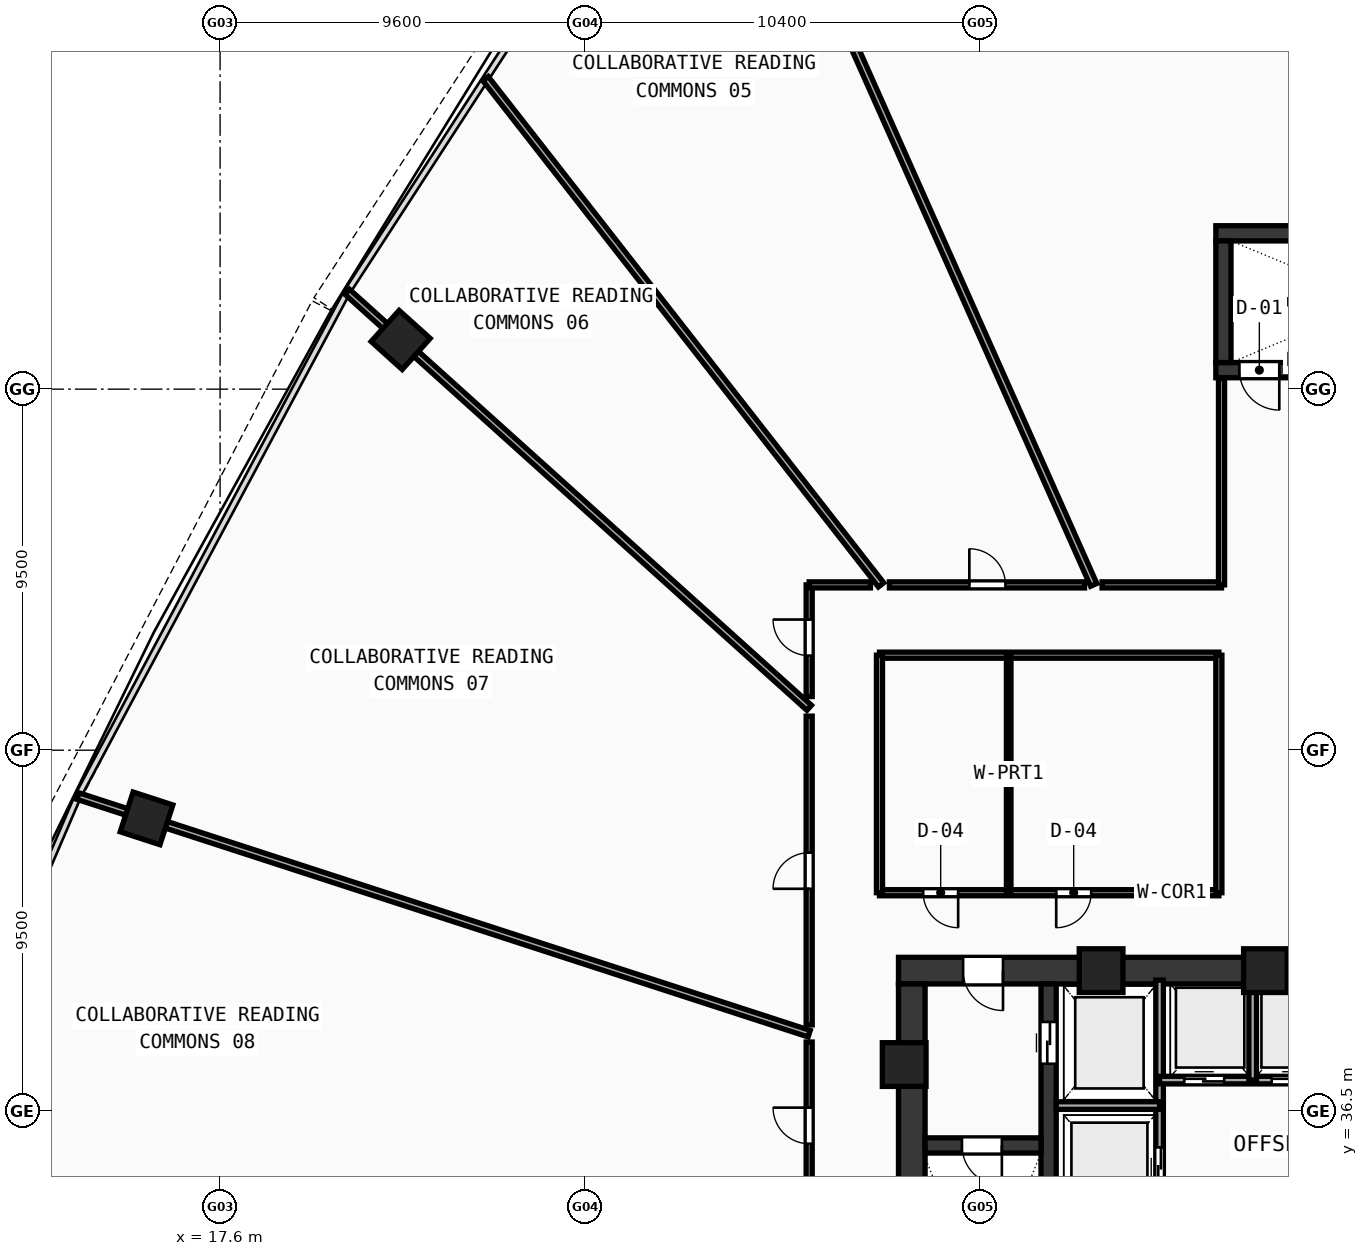
"""IFC4 building model, lengths in metres.
Left out: names, types, materials, properties, quantities, classifications, styles, units other than length and angle.
Written with IfcOpenShell. Run it as: python <this file> out.ifc"""

import sys

from ifc_helpers import new_model, si_unit, direction, frame, frame_2d, origin, origin_with_axes, origin_2d, place, context, subcontext, project, spatial, rectangle, hollow_rectangle, extrude, source, transform, mapped, element, fill, save


model = new_model("IFC4")
c1 = context("Model", 3, precision=1e-05, world=origin(), true_north=direction((0.0, 1.0)))
c2 = subcontext(c1, "Body", "Model", "MODEL_VIEW")
j1 = project(units=[si_unit("LENGTHUNIT", "METRE"), si_unit("PLANEANGLEUNIT", "RADIAN")], contexts=[c1])
p1 = place(None, origin())
s1 = spatial("IfcSite", under=j1, at=p1, CompositionType="ELEMENT")
p2 = place(p1, origin())
s2 = spatial("IfcBuilding", under=s1, at=p2, CompositionType="ELEMENT")
p3 = place(p2, frame((0.0, 0.0, 30.4)))
s3 = spatial("IfcBuildingStorey", under=s2, at=p3, CompositionType="ELEMENT", Elevation=30.4)
p4 = place(p3, frame((35.45, 40.2, 0.0), z_axis=(0.0, 0.0, 1.0), x_axis=(1.0, 0.0, 0.0)))
e1 = element("IfcWall", 1, at=p4, inside=s3, PredefinedType="SHEAR", context=c2, shape_type="SweptSolid", body=[
    extrude(rectangle(XDim=11.35, YDim=0.7, at=frame_2d((5.675, 0.0))), origin(), (0.0, 0.0, 1.0), 3.37),
])
p5 = place(p4, frame((1.7, 0.0, 0.0)))
e2 = element("IfcOpeningElement", 2, at=p5, cuts=e1, PredefinedType="OPENING", context=c2, shape_type="SweptSolid", body=[
    extrude(rectangle(XDim=1.05, YDim=2.1, at=frame_2d((0.525, 1.05))), frame((0.0, 0.36, 0.0), z_axis=(0.0, -1.0, 0.0), x_axis=(1.0, 0.0, 0.0)), (0.0, 0.0, 1.0), 0.72),
])
p6 = place(p3, frame((35.8, 27.85, 0.0), z_axis=(0.0, 0.0, 1.0), x_axis=(0.0, 1.0, 0.0)))
e3 = element("IfcWall", 3, at=p6, inside=s3, PredefinedType="SHEAR", context=c2, shape_type="SweptSolid", body=[
    extrude(rectangle(XDim=12.0, YDim=0.7, at=frame_2d((6.0, 0.0))), origin(), (0.0, 0.0, 1.0), 3.37),
])
p7 = place(p3, frame((39.4, 27.85, 0.0), z_axis=(0.0, 0.0, 1.0), x_axis=(0.0, 1.0, 0.0)))
e4 = element("IfcWall", 4, at=p7, inside=s3, PredefinedType="SHEAR", context=c2, shape_type="SweptSolid", body=[
    extrude(rectangle(XDim=12.0, YDim=0.4, at=frame_2d((6.0, 0.0))), origin(), (0.0, 0.0, 1.0), 3.37),
])
p8 = place(p7, frame((9.9, 0.0, 0.0)))
e5 = element("IfcOpeningElement", 5, at=p8, cuts=e4, PredefinedType="OPENING", context=c2, shape_type="SweptSolid", body=[
    extrude(rectangle(XDim=1.1, YDim=2.1, at=frame_2d((0.55, 1.05))), frame((0.0, 0.21, 0.0), z_axis=(0.0, -1.0, 0.0), x_axis=(1.0, 0.0, 0.0)), (0.0, 0.0, 1.0), 0.42),
])
p9 = place(p3, frame((36.15, 35.6, 0.0), z_axis=(0.0, 0.0, 1.0), x_axis=(1.0, 0.0, 0.0)))
e6 = element("IfcWall", 6, at=p9, inside=s3, PredefinedType="SHEAR", context=c2, shape_type="SweptSolid", body=[
    extrude(rectangle(XDim=3.05, YDim=0.4, at=frame_2d((1.525, 0.0))), origin(), (0.0, 0.0, 1.0), 3.37),
])
p10 = place(p9, frame((0.97, 0.0, 0.0)))
e7 = element("IfcOpeningElement", 7, at=p10, cuts=e6, PredefinedType="OPENING", context=c2, shape_type="SweptSolid", body=[
    extrude(rectangle(XDim=1.05, YDim=2.1, at=frame_2d((0.525, 1.05))), frame((0.0, 0.21, 0.0), z_axis=(0.0, -1.0, 0.0), x_axis=(1.0, 0.0, 0.0)), (0.0, 0.0, 1.0), 0.42),
])
p11 = place(p3, frame((43.8, 59.6, 0.0), z_axis=(0.0, 0.0, 1.0), x_axis=(1.0, 0.0, 0.0)))
e8 = element("IfcWall", 8, at=p11, inside=s3, PredefinedType="SHEAR", context=c2, shape_type="SweptSolid", body=[
    extrude(rectangle(XDim=8.5, YDim=0.4, at=frame_2d((4.25, 0.0))), origin(), (0.0, 0.0, 1.0), 3.37),
])
p12 = place(p3, frame((43.8, 56.0, 0.0), z_axis=(0.0, 0.0, 1.0), x_axis=(1.0, 0.0, 0.0)))
e9 = element("IfcWall", 9, at=p12, inside=s3, PredefinedType="SHEAR", context=c2, shape_type="SweptSolid", body=[
    extrude(rectangle(XDim=8.5, YDim=0.4, at=frame_2d((4.25, 0.0))), origin(), (0.0, 0.0, 1.0), 3.37),
])
p13 = place(p12, frame((0.62, 0.0, 0.0)))
e10 = element("IfcOpeningElement", 10, at=p13, cuts=e9, PredefinedType="OPENING", context=c2, shape_type="SweptSolid", body=[
    extrude(rectangle(XDim=1.05, YDim=2.1, at=frame_2d((0.525, 1.05))), frame((0.0, 0.21, 0.0), z_axis=(0.0, -1.0, 0.0), x_axis=(1.0, 0.0, 0.0)), (0.0, 0.0, 1.0), 0.42),
])
p14 = place(p3, frame((44.0, 56.2, 0.0), z_axis=(0.0, 0.0, 1.0), x_axis=(0.0, 1.0, 0.0)))
e11 = element("IfcWall", 11, at=p14, inside=s3, PredefinedType="SHEAR", context=c2, shape_type="SweptSolid", body=[
    extrude(rectangle(XDim=3.2, YDim=0.4, at=frame_2d((1.6, 0.0))), origin(), (0.0, 0.0, 1.0), 3.37),
])
m1 = source(origin(), c2, "Body", "SweptSolid", [
    extrude(hollow_rectangle(XDim=1.15, YDim=1.15, WallThickness=0.048, at=origin_2d()), origin(), (0.0, 0.0, 1.0), 3.63),
])
for number, where, z_axis, x_axis in (
    (12, (45.106, 40.2, -0.26), (0.0, 0.0, 1.0), (1.0, 0.0, 0.0)),
    (13, (40.781, 40.2, -0.26), (0.0, 0.0, 1.0), (1.0, 0.0, 0.0)),
    (14, (35.6, 37.729, -0.26), (0.0, 0.0, 1.0), (1.0, 0.0, 0.0)),
):
    element("IfcColumn", number, at=place(p3, frame(where, z_axis=z_axis, x_axis=x_axis)), inside=s3, PredefinedType="COLUMN", context=c2, shape_type="MappedRepresentation", body=[
        mapped(m1, transform((0.0, 0.0, 0.0), scale=1.0)),
    ])
m2 = source(origin(), c2, "Body", "SweptSolid", [
    extrude(hollow_rectangle(XDim=1.1, YDim=1.1, WallThickness=0.045, at=origin_2d()), origin(), (0.0, 0.0, 1.0), 3.63),
])
for number, where, z_axis, x_axis in (
    (15, (22.351, 56.794, -0.26), (0.0, 0.0, 1.0), (-0.669, -0.743, 0.0)),
    (16, (15.665, 44.206, -0.26), (0.0, 0.0, 1.0), (-0.309, -0.951, 0.0)),
):
    element("IfcColumn", number, at=place(p3, frame(where, z_axis=z_axis, x_axis=x_axis)), inside=s3, PredefinedType="COLUMN", context=c2, shape_type="MappedRepresentation", body=[
        mapped(m2, transform((0.0, 0.0, 0.0), scale=1.0)),
    ])
p15 = place(p3, frame((42.32, 33.5, 0.0), z_axis=(0.0, 0.0, 1.0), x_axis=(0.0, 1.0, 0.0)))
e17 = element("IfcWall", 17, at=p15, inside=s3, PredefinedType="SOLIDWALL", context=c2, shape_type="SweptSolid", body=[
    extrude(rectangle(XDim=6.45, YDim=0.2, at=frame_2d((3.225, 0.0))), origin(), (0.0, 0.0, 1.0), 3.37),
])
p16 = place(p15, frame((1.0, 0.0, 0.0)))
e18 = element("IfcOpeningElement", 18, at=p16, cuts=e17, PredefinedType="OPENING", context=c2, shape_type="SweptSolid", body=[
    extrude(rectangle(XDim=1.05, YDim=2.1, at=frame_2d((0.525, 1.05))), frame((0.0, 0.11, 0.0), z_axis=(0.0, -1.0, 0.0), x_axis=(1.0, 0.0, 0.0)), (0.0, 0.0, 1.0), 0.22),
])
p17 = place(p3, frame((39.6, 36.65, 0.0), z_axis=(0.0, 0.0, 1.0), x_axis=(1.0, 0.0, 0.0)))
e19 = element("IfcWall", 19, at=p17, inside=s3, PredefinedType="SOLIDWALL", context=c2, shape_type="SweptSolid", body=[
    extrude(rectangle(XDim=2.72, YDim=0.2, at=frame_2d((1.36, 0.0))), origin(), (0.0, 0.0, 1.0), 3.37),
])
p18 = place(p3, frame((42.32, 37.32, 0.0), z_axis=(0.0, 0.0, 1.0), x_axis=(1.0, 0.0, 0.0)))
e20 = element("IfcWall", 20, at=p18, inside=s3, PredefinedType="SOLIDWALL", context=c2, shape_type="SweptSolid", body=[
    extrude(rectangle(XDim=4.73, YDim=0.2, at=frame_2d((2.365, 0.0))), origin(), (0.0, 0.0, 1.0), 3.37),
])
p19 = place(p18, frame((0.65, 0.0, 0.0)))
e21 = element("IfcOpeningElement", 21, at=p19, cuts=e20, PredefinedType="OPENING", context=c2, shape_type="SweptSolid", body=[
    extrude(rectangle(XDim=1.05, YDim=2.1, at=frame_2d((0.525, 1.05))), frame((0.0, 0.11, 0.0), z_axis=(0.0, -1.0, 0.0), x_axis=(1.0, 0.0, 0.0)), (0.0, 0.0, 1.0), 0.22),
])
p20 = place(p18, frame((2.95, 0.0, 0.0)))
e22 = element("IfcOpeningElement", 22, at=p20, cuts=e20, PredefinedType="OPENING", context=c2, shape_type="SweptSolid", body=[
    extrude(rectangle(XDim=1.05, YDim=2.1, at=frame_2d((0.525, 1.05))), frame((0.0, 0.11, 0.0), z_axis=(0.0, -1.0, 0.0), x_axis=(1.0, 0.0, 0.0)), (0.0, 0.0, 1.0), 0.22),
])
p21 = place(p3, frame((44.77, 37.32, 0.0), z_axis=(0.0, 0.0, 1.0), x_axis=(0.0, 1.0, 0.0)))
e23 = element("IfcWall", 23, at=p21, inside=s3, PredefinedType="SOLIDWALL", context=c2, shape_type="SweptSolid", body=[
    extrude(rectangle(XDim=2.63, YDim=0.2, at=frame_2d((1.315, 0.0))), origin(), (0.0, 0.0, 1.0), 3.37),
])
p22 = place(p3, frame((34.95, 42.25, 0.0), z_axis=(0.0, 0.0, 1.0), x_axis=(1.0, 0.0, 0.0)))
e24 = element("IfcWall", 24, at=p22, inside=s3, PredefinedType="PARTITIONING", context=c2, shape_type="SweptSolid", body=[
    extrude(rectangle(XDim=8.93, YDim=0.16, at=frame_2d((4.465, 0.0))), origin(), (0.0, 0.0, 1.0), 2.67),
])
p23 = place(p22, frame((1.15, 0.0, 0.0)))
e25 = element("IfcOpeningElement", 25, at=p23, cuts=e24, PredefinedType="OPENING", context=c2, shape_type="SweptSolid", body=[
    extrude(rectangle(XDim=0.92, YDim=2.1, at=frame_2d((0.46, 1.05))), frame((0.0, 0.09, 0.0), z_axis=(0.0, -1.0, 0.0), x_axis=(1.0, 0.0, 0.0)), (0.0, 0.0, 1.0), 0.18),
])
p24 = place(p22, frame((4.65, 0.0, 0.0)))
e26 = element("IfcOpeningElement", 26, at=p24, cuts=e24, PredefinedType="OPENING", context=c2, shape_type="SweptSolid", body=[
    extrude(rectangle(XDim=0.92, YDim=2.1, at=frame_2d((0.46, 1.05))), frame((0.0, 0.09, 0.0), z_axis=(0.0, -1.0, 0.0), x_axis=(1.0, 0.0, 0.0)), (0.0, 0.0, 1.0), 0.18),
])
p25 = place(p3, frame((34.95, 48.5, 0.0), z_axis=(0.0, 0.0, 1.0), x_axis=(1.0, 0.0, 0.0)))
e27 = element("IfcWall", 27, at=p25, inside=s3, PredefinedType="PARTITIONING", context=c2, shape_type="SweptSolid", body=[
    extrude(rectangle(XDim=8.93, YDim=0.16, at=frame_2d((4.465, 0.0))), origin(), (0.0, 0.0, 1.0), 2.67),
])
for number, where, z_axis, x_axis in (
    (28, (34.95, 42.25, 0.0), (0.0, 0.0, 1.0), (0.0, 1.0, 0.0)),
    (29, (43.88, 42.25, 0.0), (0.0, 0.0, 1.0), (0.0, 1.0, 0.0)),
):
    element("IfcWall", number, at=place(p3, frame(where, z_axis=z_axis, x_axis=x_axis)), inside=s3, PredefinedType="PARTITIONING", context=c2, shape_type="SweptSolid", body=[
        extrude(rectangle(XDim=6.25, YDim=0.16, at=frame_2d((3.125, 0.0))), origin(), (0.0, 0.0, 1.0), 2.67),
    ])
p26 = place(p3, frame((38.35, 42.25, 0.0), z_axis=(0.0, 0.0, 1.0), x_axis=(0.0, 1.0, 0.0)))
e30 = element("IfcWall", 30, at=p26, inside=s3, PredefinedType="PARTITIONING", context=c2, shape_type="SweptSolid", body=[
    extrude(rectangle(XDim=6.25, YDim=0.12, at=frame_2d((3.125, 0.0))), origin(), (0.0, 0.0, 1.0), 2.67),
])
p27 = place(p3, frame((40.587, 50.35, 0.0), z_axis=(0.0, 0.0, 1.0), x_axis=(-0.406741199867, 0.913543428815, 0.0)))
e31 = element("IfcWall", 31, at=p27, inside=s3, PredefinedType="PARTITIONING", context=c2, shape_type="SweptSolid", body=[
    extrude(rectangle(XDim=24.65, YDim=0.18, at=frame_2d((12.325, 0.0))), origin(), (0.0, 0.0, 1.0), 2.67),
])
p28 = place(p3, frame((34.992, 50.35, 0.0), z_axis=(0.0, 0.0, 1.0), x_axis=(-0.615670109541, 0.788004007742, 0.0)))
e32 = element("IfcWall", 32, at=p28, inside=s3, PredefinedType="PARTITIONING", context=c2, shape_type="SweptSolid", body=[
    extrude(rectangle(XDim=16.902, YDim=0.18, at=frame_2d((8.451, 0.0))), origin(), (0.0, 0.0, 1.0), 2.67),
])
p29 = place(p3, frame((33.1, 47.116, 0.0), z_axis=(0.0, 0.0, 1.0), x_axis=(-0.74314347906, 0.669132101704, 0.0)))
e33 = element("IfcWall", 33, at=p29, inside=s3, PredefinedType="PARTITIONING", context=c2, shape_type="SweptSolid", body=[
    extrude(rectangle(XDim=16.358, YDim=0.18, at=frame_2d((8.179, 0.0))), origin(), (0.0, 0.0, 1.0), 2.67),
])
p30 = place(p3, frame((33.1, 38.541, 0.0), z_axis=(0.0, 0.0, 1.0), x_axis=(-0.951056237035, 0.309017853848, 0.0)))
e34 = element("IfcWall", 34, at=p30, inside=s3, PredefinedType="PARTITIONING", context=c2, shape_type="SweptSolid", body=[
    extrude(rectangle(XDim=20.231, YDim=0.18, at=frame_2d((10.115, 0.0))), origin(), (0.0, 0.0, 1.0), 2.67),
])
p31 = place(p3, frame((33.1, 33.92, 0.0), z_axis=(0.0, 0.0, 1.0), x_axis=(0.0, 1.0, 0.0)))
e35 = element("IfcWall", 35, at=p31, inside=s3, PredefinedType="PARTITIONING", context=c2, shape_type="SweptSolid", body=[
    extrude(rectangle(XDim=4.402, YDim=0.16, at=frame_2d((2.201, 0.0))), origin(), (0.0, 0.0, 1.0), 3.37),
])
p32 = place(p31, frame((1.726, 0.0, 0.0)))
e36 = element("IfcOpeningElement", 36, at=p32, cuts=e35, PredefinedType="OPENING", context=c2, shape_type="SweptSolid", body=[
    extrude(rectangle(XDim=0.95, YDim=2.1, at=frame_2d((0.475, 1.05))), frame((0.0, 0.09, 0.0), z_axis=(0.0, -1.0, 0.0), x_axis=(1.0, 0.0, 0.0)), (0.0, 0.0, 1.0), 0.18),
])
p33 = place(p3, frame((33.1, 38.773, 0.0), z_axis=(0.0, 0.0, 1.0), x_axis=(0.0, 1.0, 0.0)))
e37 = element("IfcWall", 37, at=p33, inside=s3, PredefinedType="PARTITIONING", context=c2, shape_type="SweptSolid", body=[
    extrude(rectangle(XDim=8.124, YDim=0.16, at=frame_2d((4.062, 0.0))), origin(), (0.0, 0.0, 1.0), 2.67),
])
p34 = place(p33, frame((3.581, 0.0, 0.0)))
e38 = element("IfcOpeningElement", 38, at=p34, cuts=e37, PredefinedType="OPENING", context=c2, shape_type="SweptSolid", body=[
    extrude(rectangle(XDim=0.95, YDim=2.1, at=frame_2d((0.475, 1.05))), frame((0.0, 0.09, 0.0), z_axis=(0.0, -1.0, 0.0), x_axis=(1.0, 0.0, 0.0)), (0.0, 0.0, 1.0), 0.18),
])
p35 = place(p3, frame((33.1, 47.412, 0.0), z_axis=(0.0, 0.0, 1.0), x_axis=(0.0, 1.0, 0.0)))
e39 = element("IfcWall", 39, at=p35, inside=s3, PredefinedType="PARTITIONING", context=c2, shape_type="SweptSolid", body=[
    extrude(rectangle(XDim=2.938, YDim=0.16, at=frame_2d((1.469, 0.0))), origin(), (0.0, 0.0, 1.0), 3.37),
])
p36 = place(p35, frame((1.076, 0.0, 0.0)))
e40 = element("IfcOpeningElement", 40, at=p36, cuts=e39, PredefinedType="OPENING", context=c2, shape_type="SweptSolid", body=[
    extrude(rectangle(XDim=0.95, YDim=2.1, at=frame_2d((0.475, 1.05))), frame((0.0, 0.09, 0.0), z_axis=(0.0, -1.0, 0.0), x_axis=(1.0, 0.0, 0.0)), (0.0, 0.0, 1.0), 0.18),
])
p37 = place(p3, frame((33.1, 50.35, 0.0), z_axis=(0.0, 0.0, 1.0), x_axis=(1.0, 0.0, 0.0)))
e41 = element("IfcWall", 41, at=p37, inside=s3, PredefinedType="PARTITIONING", context=c2, shape_type="SweptSolid", body=[
    extrude(rectangle(XDim=1.612, YDim=0.16, at=frame_2d((0.806, 0.0))), origin(), (0.0, 0.0, 1.0), 3.37),
])
p38 = place(p3, frame((35.211, 50.35, 0.0), z_axis=(0.0, 0.0, 1.0), x_axis=(1.0, 0.0, 0.0)))
e42 = element("IfcWall", 42, at=p38, inside=s3, PredefinedType="PARTITIONING", context=c2, shape_type="SweptSolid", body=[
    extrude(rectangle(XDim=5.135, YDim=0.16, at=frame_2d((2.567, 0.0))), origin(), (0.0, 0.0, 1.0), 2.97),
])
p39 = place(p38, frame((2.103, 0.0, 0.0)))
e43 = element("IfcOpeningElement", 43, at=p39, cuts=e42, PredefinedType="OPENING", context=c2, shape_type="SweptSolid", body=[
    extrude(rectangle(XDim=0.95, YDim=2.1, at=frame_2d((0.475, 1.05))), frame((0.0, 0.09, 0.0), z_axis=(0.0, -1.0, 0.0), x_axis=(1.0, 0.0, 0.0)), (0.0, 0.0, 1.0), 0.18),
])
p40 = place(p3, frame((40.807, 50.35, 0.0), z_axis=(0.0, 0.0, 1.0), x_axis=(1.0, 0.0, 0.0)))
e44 = element("IfcWall", 44, at=p40, inside=s3, PredefinedType="PARTITIONING", context=c2, shape_type="SweptSolid", body=[
    extrude(rectangle(XDim=3.143, YDim=0.16, at=frame_2d((1.572, 0.0))), origin(), (0.0, 0.0, 1.0), 2.67),
])
p41 = place(p3, frame((43.95, 50.35, 0.0), z_axis=(0.0, 0.0, 1.0), x_axis=(0.0, 1.0, 0.0)))
e45 = element("IfcWall", 45, at=p41, inside=s3, PredefinedType="PARTITIONING", context=c2, shape_type="SweptSolid", body=[
    extrude(rectangle(XDim=5.43, YDim=0.16, at=frame_2d((2.715, 0.0))), origin(), (0.0, 0.0, 1.0), 2.97),
])
m3 = source(origin(), c2, "Body", "SweptSolid", [
    extrude(rectangle(XDim=1.05, YDim=2.1, at=frame_2d((0.525, 1.05))), frame((0.0, 0.025, 0.0), z_axis=(0.0, -1.0, 0.0), x_axis=(1.0, 0.0, 0.0)), (0.0, 0.0, 1.0), 0.05),
])
p42 = place(p10, frame((1.05, 0.0, 0.0), z_axis=(0.0, 0.0, 1.0), x_axis=(-1.0, 0.0, 0.0)))
e46 = element("IfcDoor", 46, at=p42, inside=s3, OperationType="SINGLE_SWING_LEFT", PredefinedType="DOOR", context=c2, shape_type="MappedRepresentation", body=[
    mapped(m3, transform((0.0, 0.0, 0.0), scale=1.0)),
])
fill(e7, e46)
p43 = place(p5, frame((1.05, 0.0, 0.0), z_axis=(0.0, 0.0, 1.0), x_axis=(-1.0, 0.0, 0.0)))
e47 = element("IfcDoor", 47, at=p43, inside=s3, OperationType="SINGLE_SWING_LEFT", PredefinedType="DOOR", context=c2, shape_type="MappedRepresentation", body=[
    mapped(m3, transform((0.0, 0.0, 0.0), scale=1.0)),
])
fill(e2, e47)
m4 = source(origin(), c2, "Body", "SweptSolid", [
    extrude(rectangle(XDim=1.1, YDim=2.1, at=frame_2d((0.55, 1.05))), frame((0.0, 0.025, 0.0), z_axis=(0.0, -1.0, 0.0), x_axis=(1.0, 0.0, 0.0)), (0.0, 0.0, 1.0), 0.05),
])
p44 = place(p8, frame((1.1, 0.0, 0.0), z_axis=(0.0, 0.0, 1.0), x_axis=(-1.0, 0.0, 0.0)))
e48 = element("IfcDoor", 48, at=p44, inside=s3, OperationType="DOUBLE_DOOR_SLIDING", PredefinedType="DOOR", context=c2, shape_type="MappedRepresentation", body=[
    mapped(m4, transform((0.0, 0.0, 0.0), scale=1.0)),
])
fill(e5, e48)
p45 = place(p16, origin_with_axes())
e49 = element("IfcDoor", 49, at=p45, inside=s3, OperationType="DOUBLE_DOOR_SLIDING", PredefinedType="DOOR", context=c2, shape_type="MappedRepresentation", body=[
    mapped(m3, transform((0.0, 0.0, 0.0), scale=1.0)),
])
fill(e18, e49)
p46 = place(p19, frame((1.05, 0.0, 0.0), z_axis=(0.0, 0.0, 1.0), x_axis=(-1.0, 0.0, 0.0)))
e50 = element("IfcDoor", 50, at=p46, inside=s3, OperationType="DOUBLE_DOOR_SLIDING", PredefinedType="DOOR", context=c2, shape_type="MappedRepresentation", body=[
    mapped(m3, transform((0.0, 0.0, 0.0), scale=1.0)),
])
fill(e21, e50)
p47 = place(p20, frame((1.05, 0.0, 0.0), z_axis=(0.0, 0.0, 1.0), x_axis=(-1.0, 0.0, 0.0)))
e51 = element("IfcDoor", 51, at=p47, inside=s3, OperationType="DOUBLE_DOOR_SLIDING", PredefinedType="DOOR", context=c2, shape_type="MappedRepresentation", body=[
    mapped(m3, transform((0.0, 0.0, 0.0), scale=1.0)),
])
fill(e22, e51)
p48 = place(p13, frame((1.05, 0.0, 0.0), z_axis=(0.0, 0.0, 1.0), x_axis=(-1.0, 0.0, 0.0)))
e52 = element("IfcDoor", 52, at=p48, inside=s3, OperationType="SINGLE_SWING_LEFT", PredefinedType="DOOR", context=c2, shape_type="MappedRepresentation", body=[
    mapped(m3, transform((0.0, 0.0, 0.0), scale=1.0)),
])
fill(e10, e52)
m5 = source(origin(), c2, "Body", "SweptSolid", [
    extrude(rectangle(XDim=0.92, YDim=2.1, at=frame_2d((0.46, 1.05))), frame((0.0, 0.025, 0.0), z_axis=(0.0, -1.0, 0.0), x_axis=(1.0, 0.0, 0.0)), (0.0, 0.0, 1.0), 0.05),
])
p49 = place(p23, frame((0.92, 0.0, 0.0), z_axis=(0.0, 0.0, 1.0), x_axis=(-1.0, 0.0, 0.0)))
e53 = element("IfcDoor", 53, at=p49, inside=s3, OperationType="SINGLE_SWING_LEFT", PredefinedType="DOOR", context=c2, shape_type="MappedRepresentation", body=[
    mapped(m5, transform((0.0, 0.0, 0.0), scale=1.0)),
])
fill(e25, e53)
p50 = place(p24, frame((0.92, 0.0, 0.0), z_axis=(0.0, 0.0, 1.0), x_axis=(-1.0, 0.0, 0.0)))
e54 = element("IfcDoor", 54, at=p50, inside=s3, OperationType="SINGLE_SWING_RIGHT", PredefinedType="DOOR", context=c2, shape_type="MappedRepresentation", body=[
    mapped(m5, transform((0.0, 0.0, 0.0), scale=1.0)),
])
fill(e26, e54)
m6 = source(origin(), c2, "Body", "SweptSolid", [
    extrude(rectangle(XDim=0.95, YDim=2.1, at=frame_2d((0.475, 1.05))), frame((0.0, 0.025, 0.0), z_axis=(0.0, -1.0, 0.0), x_axis=(1.0, 0.0, 0.0)), (0.0, 0.0, 1.0), 0.05),
])
p51 = place(p39, origin_with_axes())
e55 = element("IfcDoor", 55, at=p51, inside=s3, OperationType="SINGLE_SWING_LEFT", PredefinedType="DOOR", context=c2, shape_type="MappedRepresentation", body=[
    mapped(m6, transform((0.0, 0.0, 0.0), scale=1.0)),
])
fill(e43, e55)
p52 = place(p36, origin_with_axes())
e56 = element("IfcDoor", 56, at=p52, inside=s3, OperationType="SINGLE_SWING_RIGHT", PredefinedType="DOOR", context=c2, shape_type="MappedRepresentation", body=[
    mapped(m6, transform((0.0, 0.0, 0.0), scale=1.0)),
])
fill(e40, e56)
p53 = place(p34, origin_with_axes())
e57 = element("IfcDoor", 57, at=p53, inside=s3, OperationType="SINGLE_SWING_LEFT", PredefinedType="DOOR", context=c2, shape_type="MappedRepresentation", body=[
    mapped(m6, transform((0.0, 0.0, 0.0), scale=1.0)),
])
fill(e38, e57)
p54 = place(p32, origin_with_axes())
e58 = element("IfcDoor", 58, at=p54, inside=s3, OperationType="SINGLE_SWING_RIGHT", PredefinedType="DOOR", context=c2, shape_type="MappedRepresentation", body=[
    mapped(m6, transform((0.0, 0.0, 0.0), scale=1.0)),
])
fill(e36, e58)
save(model, sys.argv[1])
